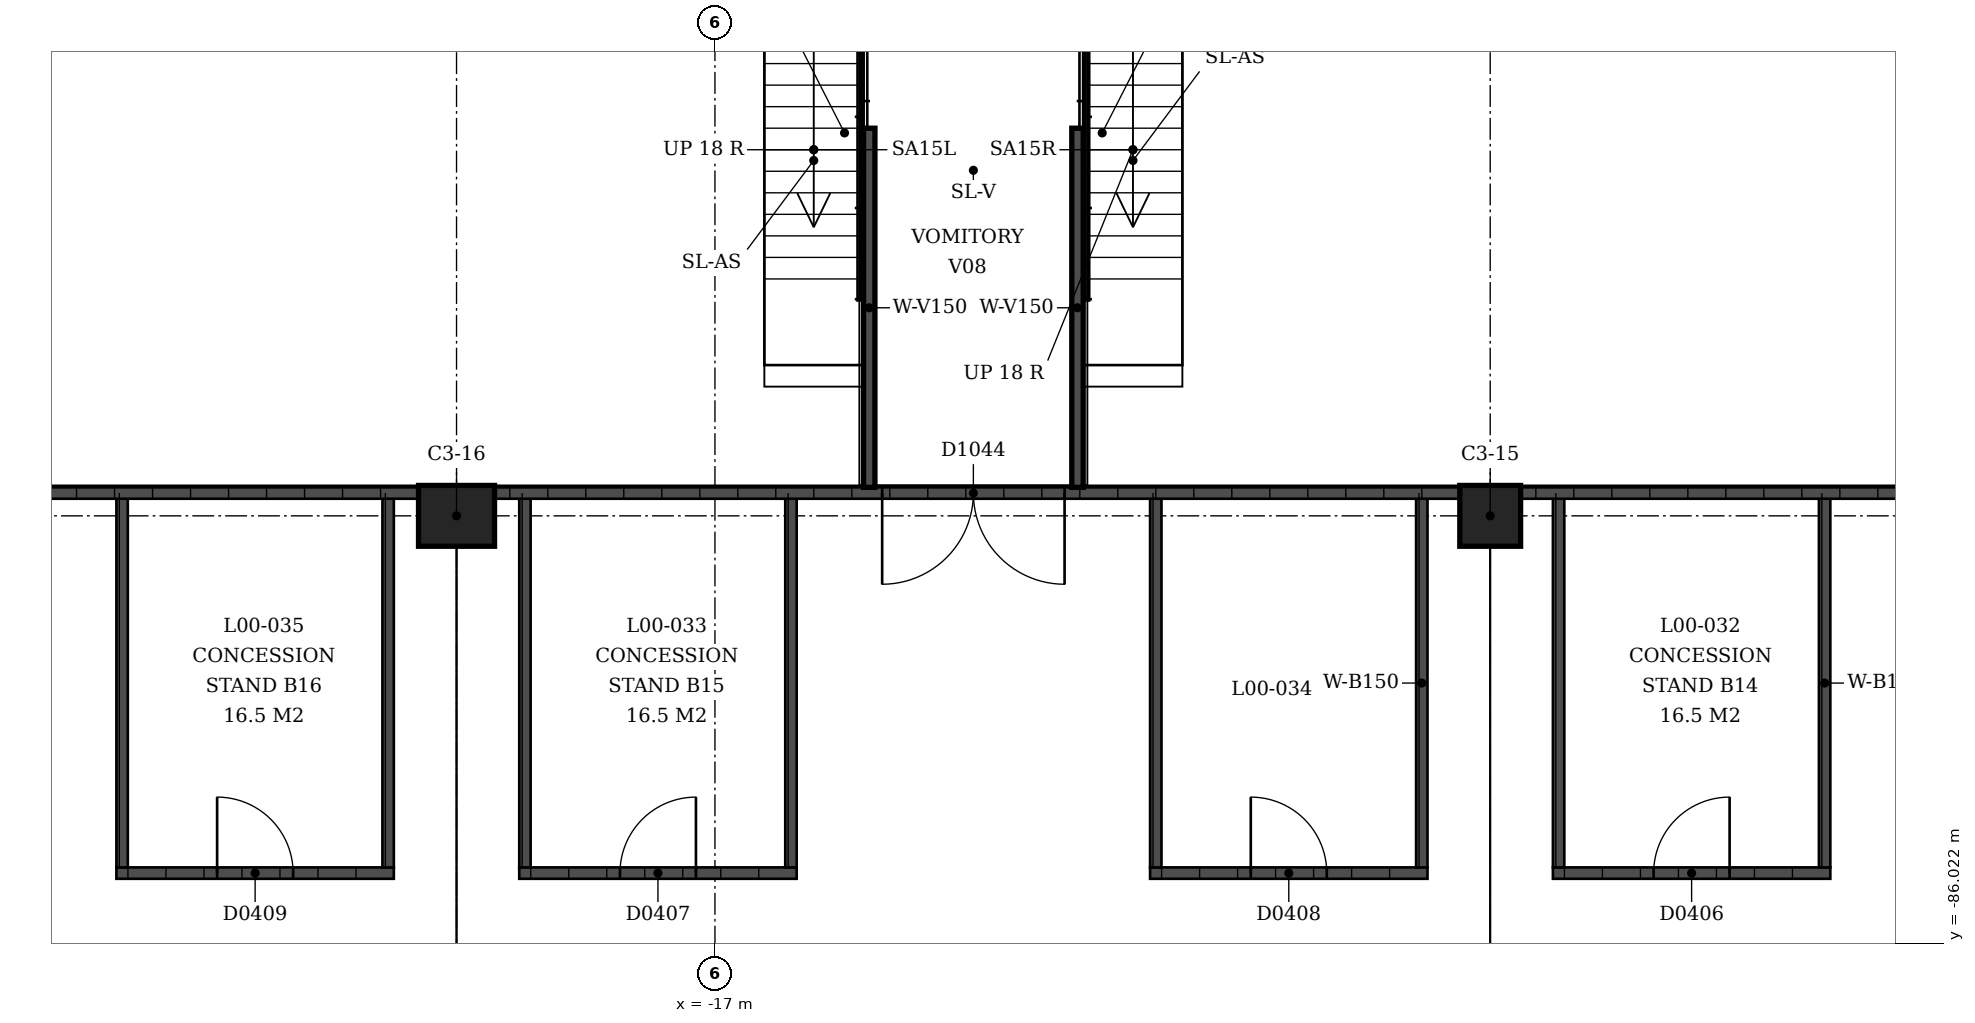
"""IFC4 building model, lengths in metres.
Left out: names, types, materials, properties, quantities, classifications, styles, units other than length and angle.
Written with IfcOpenShell. Run it as: python <this file> out.ifc"""

import sys

from ifc_helpers import new_model, si_unit, direction, frame, frame_2d, origin, origin_2d, place, context, subcontext, project, spatial, rectangle, extrude, element, fill, save


model = new_model("IFC4")
c1 = context("Model", 3, precision=1e-05, world=origin(), true_north=direction((0.0, 1.0)))
c2 = subcontext(c1, "Body", "Model", "MODEL_VIEW")
j1 = project(units=[si_unit("LENGTHUNIT", "METRE"), si_unit("PLANEANGLEUNIT", "RADIAN")], contexts=[c1])
p1 = place(None, origin())
s1 = spatial("IfcSite", under=j1, at=p1, CompositionType="ELEMENT")
p2 = place(p1, origin())
s2 = spatial("IfcBuilding", under=s1, at=p2, CompositionType="ELEMENT")
p3 = place(p2, origin())
s3 = spatial("IfcBuildingStorey", under=s2, at=p3, CompositionType="ELEMENT", Elevation=0.0)
p4 = place(p3, frame((-6.8, -80.4, 0.0), z_axis=(0.0, 0.0, 1.0), x_axis=(1.0, 0.0, 0.0)))
e1 = element("IfcColumn", 1, at=p4, inside=s3, PredefinedType="COLUMN", context=c2, shape_type="SweptSolid", body=[
    extrude(rectangle(XDim=0.8, YDim=0.8, at=origin_2d()), origin(), (0.0, 0.0, 1.0), 4.5),
])
p5 = place(p3, frame((-20.4, -80.4, 0.0), z_axis=(0.0, 0.0, 1.0), x_axis=(1.0, 0.0, 0.0)))
e2 = element("IfcColumn", 2, at=p5, inside=s3, PredefinedType="COLUMN", context=c2, shape_type="SweptSolid", body=[
    extrude(rectangle(XDim=1.0, YDim=0.8, at=origin_2d()), origin(), (0.0, 0.0, 1.0), 4.5),
])
p6 = place(p3, frame((-2.325, -85.1, 0.0), z_axis=(0.0, 0.0, 1.0), x_axis=(-1.0, 0.0, 0.0)))
e3 = element("IfcWall", 3, at=p6, inside=s3, PredefinedType="SOLIDWALL", context=c2, shape_type="SweptSolid", body=[
    extrude(rectangle(XDim=3.65, YDim=0.15, at=frame_2d((1.825, 0.0))), origin(), (0.0, 0.0, 1.0), 3.0),
])
p7 = place(p6, frame((1.325, 0.0, 0.0)))
e4 = element("IfcOpeningElement", 4, at=p7, cuts=e3, PredefinedType="OPENING", context=c2, shape_type="SweptSolid", body=[
    extrude(rectangle(XDim=1.0, YDim=2.1, at=frame_2d((0.5, 1.05))), frame((0.0, 0.075, 0.0), z_axis=(0.0, -1.0, 0.0), x_axis=(1.0, 0.0, 0.0)), (0.0, 0.0, 1.0), 0.15),
])
for number, where, z_axis, x_axis in (
    (5, (-2.4, -80.1, 0.0), (0.0, 0.0, 1.0), (0.0, -1.0, 0.0)),
    (6, (-5.9, -80.1, 0.0), (0.0, 0.0, 1.0), (0.0, -1.0, 0.0)),
):
    element("IfcWall", number, at=place(p3, frame(where, z_axis=z_axis, x_axis=x_axis)), inside=s3, PredefinedType="SOLIDWALL", context=c2, shape_type="SweptSolid", body=[
        extrude(rectangle(XDim=4.925, YDim=0.15, at=frame_2d((2.462, 0.0))), origin(), (0.0, 0.0, 1.0), 3.0),
    ])
p8 = place(p3, frame((-19.575, -85.1, 0.0), z_axis=(0.0, 0.0, 1.0), x_axis=(1.0, 0.0, 0.0)))
e7 = element("IfcWall", 7, at=p8, inside=s3, PredefinedType="SOLIDWALL", context=c2, shape_type="SweptSolid", body=[
    extrude(rectangle(XDim=3.65, YDim=0.15, at=frame_2d((1.825, 0.0))), origin(), (0.0, 0.0, 1.0), 3.0),
])
p9 = place(p8, frame((1.325, 0.0, 0.0)))
e8 = element("IfcOpeningElement", 8, at=p9, cuts=e7, PredefinedType="OPENING", context=c2, shape_type="SweptSolid", body=[
    extrude(rectangle(XDim=1.0, YDim=2.1, at=frame_2d((0.5, 1.05))), frame((0.0, 0.075, 0.0), z_axis=(0.0, -1.0, 0.0), x_axis=(1.0, 0.0, 0.0)), (0.0, 0.0, 1.0), 0.15),
])
for number, where, z_axis, x_axis in (
    (9, (-19.5, -80.1, 0.0), (0.0, 0.0, 1.0), (0.0, -1.0, 0.0)),
    (10, (-16.0, -80.1, 0.0), (0.0, 0.0, 1.0), (0.0, -1.0, 0.0)),
):
    element("IfcWall", number, at=place(p3, frame(where, z_axis=z_axis, x_axis=x_axis)), inside=s3, PredefinedType="SOLIDWALL", context=c2, shape_type="SweptSolid", body=[
        extrude(rectangle(XDim=4.925, YDim=0.15, at=frame_2d((2.462, 0.0))), origin(), (0.0, 0.0, 1.0), 3.0),
    ])
p10 = place(p3, frame((-11.275, -85.1, 0.0), z_axis=(0.0, 0.0, 1.0), x_axis=(1.0, 0.0, 0.0)))
e11 = element("IfcWall", 11, at=p10, inside=s3, PredefinedType="SOLIDWALL", context=c2, shape_type="SweptSolid", body=[
    extrude(rectangle(XDim=3.65, YDim=0.15, at=frame_2d((1.825, 0.0))), origin(), (0.0, 0.0, 1.0), 3.0),
])
p11 = place(p10, frame((1.325, 0.0, 0.0)))
e12 = element("IfcOpeningElement", 12, at=p11, cuts=e11, PredefinedType="OPENING", context=c2, shape_type="SweptSolid", body=[
    extrude(rectangle(XDim=1.0, YDim=2.1, at=frame_2d((0.5, 1.05))), frame((0.0, 0.075, 0.0), z_axis=(0.0, -1.0, 0.0), x_axis=(1.0, 0.0, 0.0)), (0.0, 0.0, 1.0), 0.15),
])
for number, where, z_axis, x_axis in (
    (13, (-11.2, -80.1, 0.0), (0.0, 0.0, 1.0), (0.0, -1.0, 0.0)),
    (14, (-7.7, -80.1, 0.0), (0.0, 0.0, 1.0), (0.0, -1.0, 0.0)),
):
    element("IfcWall", number, at=place(p3, frame(where, z_axis=z_axis, x_axis=x_axis)), inside=s3, PredefinedType="SOLIDWALL", context=c2, shape_type="SweptSolid", body=[
        extrude(rectangle(XDim=4.925, YDim=0.15, at=frame_2d((2.462, 0.0))), origin(), (0.0, 0.0, 1.0), 3.0),
    ])
p12 = place(p3, frame((-21.225, -85.1, 0.0), z_axis=(0.0, 0.0, 1.0), x_axis=(-1.0, 0.0, 0.0)))
e15 = element("IfcWall", 15, at=p12, inside=s3, PredefinedType="SOLIDWALL", context=c2, shape_type="SweptSolid", body=[
    extrude(rectangle(XDim=3.65, YDim=0.15, at=frame_2d((1.825, 0.0))), origin(), (0.0, 0.0, 1.0), 3.0),
])
p13 = place(p12, frame((1.325, 0.0, 0.0)))
e16 = element("IfcOpeningElement", 16, at=p13, cuts=e15, PredefinedType="OPENING", context=c2, shape_type="SweptSolid", body=[
    extrude(rectangle(XDim=1.0, YDim=2.1, at=frame_2d((0.5, 1.05))), frame((0.0, 0.075, 0.0), z_axis=(0.0, -1.0, 0.0), x_axis=(1.0, 0.0, 0.0)), (0.0, 0.0, 1.0), 0.15),
])
for number, where, z_axis, x_axis in (
    (17, (-21.3, -80.1, 0.0), (0.0, 0.0, 1.0), (0.0, -1.0, 0.0)),
    (18, (-24.8, -80.1, 0.0), (0.0, 0.0, 1.0), (0.0, -1.0, 0.0)),
):
    element("IfcWall", number, at=place(p3, frame(where, z_axis=z_axis, x_axis=x_axis)), inside=s3, PredefinedType="SOLIDWALL", context=c2, shape_type="SweptSolid", body=[
        extrude(rectangle(XDim=4.925, YDim=0.15, at=frame_2d((2.462, 0.0))), origin(), (0.0, 0.0, 1.0), 3.0),
    ])
p14 = place(p3, frame((6.3, -80.1, 0.0), z_axis=(0.0, 0.0, 1.0), x_axis=(-1.0, 0.0, 0.0)))
e19 = element("IfcWall", 19, at=p14, inside=s3, PredefinedType="SOLIDWALL", context=c2, shape_type="SweptSolid", body=[
    extrude(rectangle(XDim=12.7, YDim=0.15, at=frame_2d((6.35, 0.0))), origin(), (0.0, 0.0, 1.0), 3.0),
])
p15 = place(p3, frame((-7.2, -80.1, 0.0), z_axis=(0.0, 0.0, 1.0), x_axis=(-1.0, 0.0, 0.0)))
e20 = element("IfcWall", 20, at=p15, inside=s3, PredefinedType="SOLIDWALL", context=c2, shape_type="SweptSolid", body=[
    extrude(rectangle(XDim=12.7, YDim=0.15, at=frame_2d((6.35, 0.0))), origin(), (0.0, 0.0, 1.0), 3.0),
])
p16 = place(p15, frame((5.2, 0.0, 0.0)))
e21 = element("IfcOpeningElement", 21, at=p16, cuts=e20, PredefinedType="OPENING", context=c2, shape_type="SweptSolid", body=[
    extrude(rectangle(XDim=2.4, YDim=2.4, at=frame_2d((1.2, 1.2))), frame((0.0, 0.075, 0.0), z_axis=(0.0, -1.0, 0.0), x_axis=(1.0, 0.0, 0.0)), (0.0, 0.0, 1.0), 0.15),
])
p17 = place(p3, frame((-20.9, -80.1, 0.0), z_axis=(0.0, 0.0, 1.0), x_axis=(-1.0, 0.0, 0.0)))
e22 = element("IfcWall", 22, at=p17, inside=s3, PredefinedType="SOLIDWALL", context=c2, shape_type="SweptSolid", body=[
    extrude(rectangle(XDim=12.7, YDim=0.15, at=frame_2d((6.35, 0.0))), origin(), (0.0, 0.0, 1.0), 3.0),
])
for number, where, z_axis, x_axis in (
    (23, (-14.97, -75.3, 0.0), (0.0, 0.0, 1.0), (0.0, -1.0, 0.0)),
    (24, (-12.23, -75.3, 0.0), (0.0, 0.0, 1.0), (0.0, -1.0, 0.0)),
):
    element("IfcWall", number, at=place(p3, frame(where, z_axis=z_axis, x_axis=x_axis)), inside=s3, PredefinedType="SOLIDWALL", context=c2, shape_type="SweptSolid", body=[
        extrude(rectangle(XDim=4.725, YDim=0.15, at=frame_2d((2.362, 0.0))), origin(), (0.0, 0.0, 1.0), 2.75),
    ])
p18 = place(p7, origin())
e25 = element("IfcDoor", 25, at=p18, inside=s3, OperationType="SINGLE_SWING_LEFT", PredefinedType="DOOR", context=c2, shape_type="SweptSolid", body=[
    extrude(rectangle(XDim=1.0, YDim=2.1, at=frame_2d((0.5, 1.05))), frame((0.0, 0.025, 0.0), z_axis=(0.0, -1.0, 0.0), x_axis=(1.0, 0.0, 0.0)), (0.0, 0.0, 1.0), 0.05),
])
fill(e4, e25)
p19 = place(p9, origin())
e26 = element("IfcDoor", 26, at=p19, inside=s3, OperationType="SINGLE_SWING_LEFT", PredefinedType="DOOR", context=c2, shape_type="SweptSolid", body=[
    extrude(rectangle(XDim=1.0, YDim=2.1, at=frame_2d((0.5, 1.05))), frame((0.0, 0.025, 0.0), z_axis=(0.0, -1.0, 0.0), x_axis=(1.0, 0.0, 0.0)), (0.0, 0.0, 1.0), 0.05),
])
fill(e8, e26)
p20 = place(p11, origin())
e27 = element("IfcDoor", 27, at=p20, inside=s3, OperationType="SINGLE_SWING_RIGHT", PredefinedType="DOOR", context=c2, shape_type="SweptSolid", body=[
    extrude(rectangle(XDim=1.0, YDim=2.1, at=frame_2d((0.5, 1.05))), frame((0.0, 0.025, 0.0), z_axis=(0.0, -1.0, 0.0), x_axis=(1.0, 0.0, 0.0)), (0.0, 0.0, 1.0), 0.05),
])
fill(e12, e27)
p21 = place(p13, origin())
e28 = element("IfcDoor", 28, at=p21, inside=s3, OperationType="SINGLE_SWING_RIGHT", PredefinedType="DOOR", context=c2, shape_type="SweptSolid", body=[
    extrude(rectangle(XDim=1.0, YDim=2.1, at=frame_2d((0.5, 1.05))), frame((0.0, 0.025, 0.0), z_axis=(0.0, -1.0, 0.0), x_axis=(1.0, 0.0, 0.0)), (0.0, 0.0, 1.0), 0.05),
])
fill(e16, e28)
p22 = place(p16, origin())
e29 = element("IfcDoor", 29, at=p22, inside=s3, OperationType="DOUBLE_DOOR_SINGLE_SWING", PredefinedType="DOOR", context=c2, shape_type="SweptSolid", body=[
    extrude(rectangle(XDim=2.4, YDim=2.4, at=frame_2d((1.2, 1.2))), frame((0.0, 0.025, 0.0), z_axis=(0.0, -1.0, 0.0), x_axis=(1.0, 0.0, 0.0)), (0.0, 0.0, 1.0), 0.05),
])
fill(e21, e29)
save(model, sys.argv[1])
